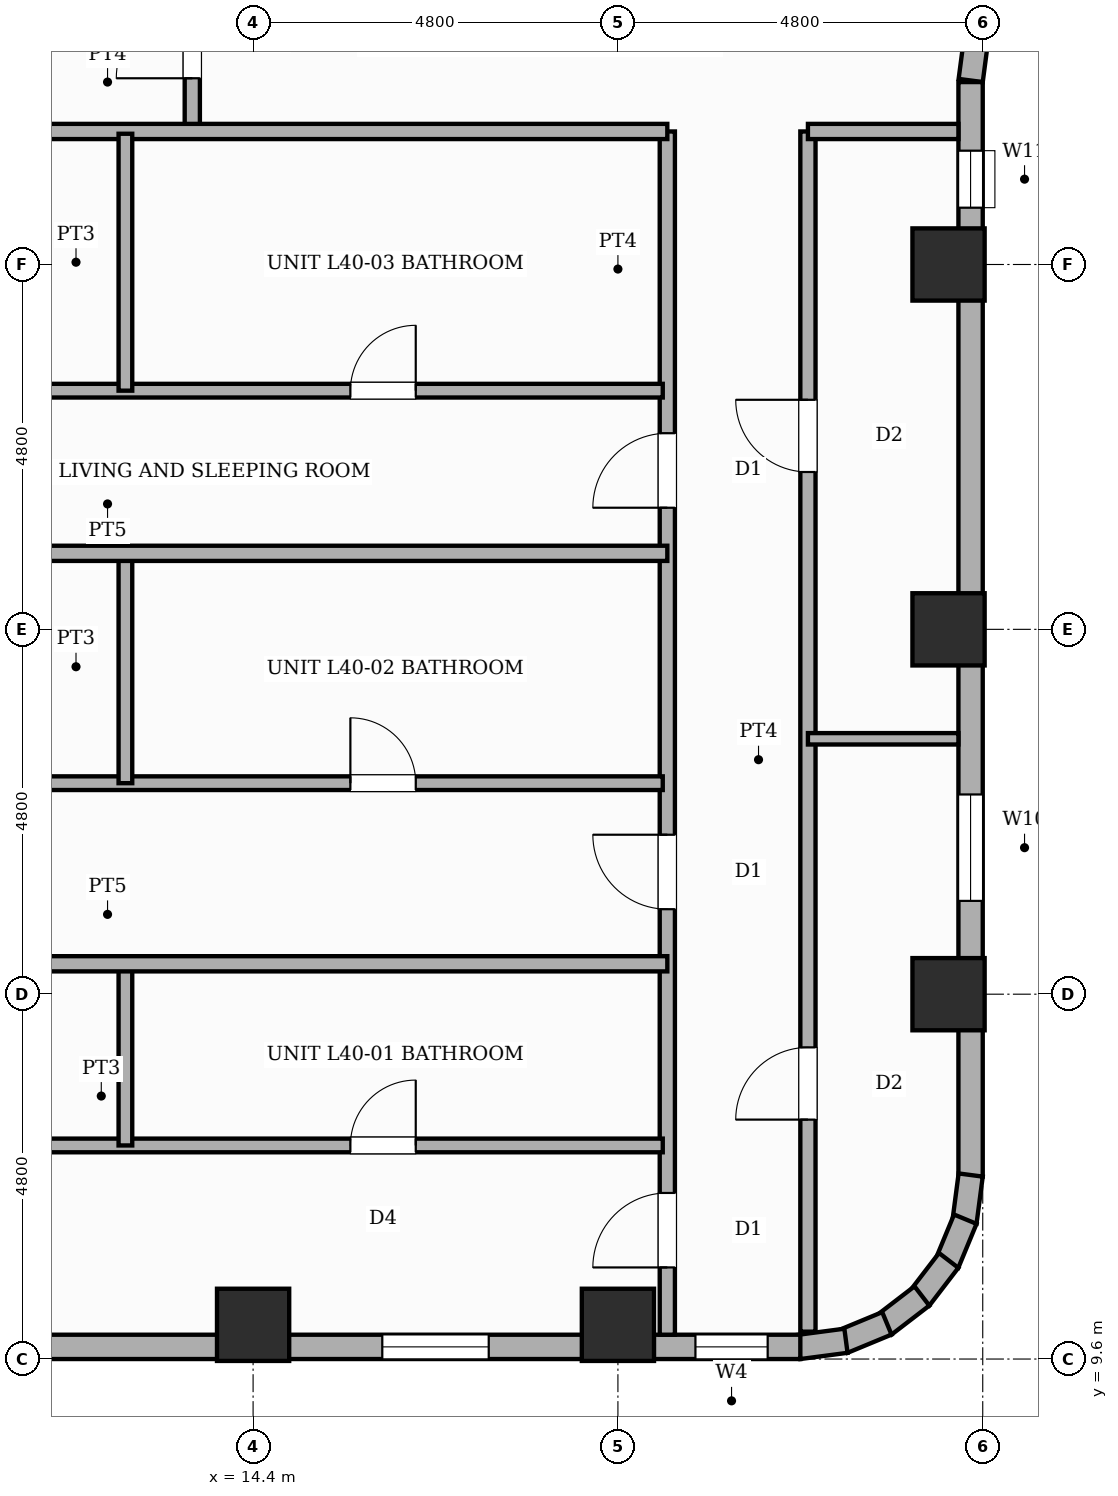
"""IFC4 building model, lengths in metres.
Left out: names, types, materials, properties, quantities, classifications, styles, units other than length and angle.
Written with IfcOpenShell. Run it as: python <this file> out.ifc"""

import sys

from ifc_helpers import new_model, si_unit, direction, frame, frame_2d, origin, origin_2d, place, context, subcontext, project, spatial, rectangle, extrude, element, fill, save


model = new_model("IFC4")
c1 = context("Model", 3, precision=1e-05, world=origin(), true_north=direction((0.0, 1.0)))
c2 = subcontext(c1, "Body", "Model", "MODEL_VIEW")
j1 = project(units=[si_unit("LENGTHUNIT", "METRE"), si_unit("PLANEANGLEUNIT", "RADIAN")], contexts=[c1])
p1 = place(None, origin())
s1 = spatial("IfcSite", under=j1, at=p1, CompositionType="ELEMENT")
p2 = place(p1, origin())
s2 = spatial("IfcBuilding", under=s1, at=p2, CompositionType="ELEMENT")
p3 = place(p2, frame((0.0, 0.0, 154.0)))
s3 = spatial("IfcBuildingStorey", under=s2, at=p3, CompositionType="ELEMENT", Elevation=154.0)
for number, where, z_axis, x_axis in (
    (1, (14.4, 10.05, 0.0), (0.0, 0.0, 1.0), (1.0, 0.0, 0.0)),
    (2, (19.2, 10.05, 0.0), (0.0, 0.0, 1.0), (1.0, 0.0, 0.0)),
    (3, (23.55, 14.4, 0.0), (0.0, 0.0, 1.0), (1.0, 0.0, 0.0)),
    (4, (23.55, 19.2, 0.0), (0.0, 0.0, 1.0), (1.0, 0.0, 0.0)),
    (5, (23.55, 24.0, 0.0), (0.0, 0.0, 1.0), (1.0, 0.0, 0.0)),
):
    element("IfcColumn", number, at=place(p3, frame(where, z_axis=z_axis, x_axis=x_axis)), inside=s3, PredefinedType="COLUMN", context=c2, shape_type="SweptSolid", body=[
        extrude(rectangle(XDim=0.95, YDim=0.95, at=origin_2d()), origin(), (0.0, 0.0, 1.0), 3.6),
    ])
p4 = place(p3, frame((23.923, 27.042, 0.0), z_axis=(0.0, 0.0, 1.0), x_axis=(-0.130555323746, -0.9914410257, 0.0)))
e6 = element("IfcWall", 6, at=p4, inside=s3, PredefinedType="STANDARD", context=c2, shape_type="SweptSolid", body=[
    extrude(rectangle(XDim=0.626, YDim=0.32, at=frame_2d((0.313, 0.0))), origin(), (0.0, 0.0, 1.0), 2.54),
])
p5 = place(p3, frame((23.84, 26.4, 0.0), z_axis=(0.0, 0.0, 1.0), x_axis=(0.0, -1.0, 0.0)))
e7 = element("IfcWall", 7, at=p5, inside=s3, PredefinedType="STANDARD", context=c2, shape_type="SweptSolid", body=[
    extrude(rectangle(XDim=14.4, YDim=0.32, at=frame_2d((7.2, 0.0))), origin(), (0.0, 0.0, 1.0), 2.54),
])
p6 = place(p5, frame((9.373, 0.0, 0.65)))
e8 = element("IfcOpeningElement", 8, at=p6, cuts=e7, PredefinedType="OPENING", context=c2, shape_type="SweptSolid", body=[
    extrude(rectangle(XDim=1.4, YDim=1.1, at=frame_2d((0.7, 0.55))), frame((0.0, 0.17, 0.0), z_axis=(0.0, -1.0, 0.0), x_axis=(1.0, 0.0, 0.0)), (0.0, 0.0, 1.0), 0.34),
])
p7 = place(p5, frame((0.903, 0.0, 0.45)))
e9 = element("IfcOpeningElement", 9, at=p7, cuts=e7, PredefinedType="OPENING", context=c2, shape_type="SweptSolid", body=[
    extrude(rectangle(XDim=0.75, YDim=1.8, at=frame_2d((0.375, 0.9))), frame((0.0, 0.17, 0.0), z_axis=(0.0, -1.0, 0.0), x_axis=(1.0, 0.0, 0.0)), (0.0, 0.0, 1.0), 0.34),
])
p8 = place(p3, frame((23.841, 12.021, 0.0), z_axis=(0.0, 0.0, 1.0), x_axis=(-0.130504898859, -0.991447664465, 0.0)))
e10 = element("IfcWall", 10, at=p8, inside=s3, PredefinedType="STANDARD", context=c2, shape_type="SweptSolid", body=[
    extrude(rectangle(XDim=0.627, YDim=0.32, at=frame_2d((0.313, 0.0))), origin(), (0.0, 0.0, 1.0), 3.36),
])
for number, where, z_axis, x_axis in (
    (11, (23.771, 11.44, 0.0), (0.0, 0.0, 1.0), (-0.383, -0.924, 0.0)),
    (12, (23.552, 10.897, 0.0), (0.0, 0.0, 1.0), (-0.609, -0.793, 0.0)),
    (13, (23.2, 10.43, 0.0), (0.0, 0.0, 1.0), (-0.793, -0.609, 0.0)),
    (14, (22.739, 10.069, 0.0), (0.0, 0.0, 1.0), (-0.924, -0.383, 0.0)),
    (15, (22.2, 9.84, 0.0), (0.0, 0.0, 1.0), (-0.991, -0.131, 0.0)),
):
    element("IfcWall", number, at=place(p3, frame(where, z_axis=z_axis, x_axis=x_axis)), inside=s3, PredefinedType="STANDARD", context=c2, shape_type="SweptSolid", body=[
        extrude(rectangle(XDim=0.626, YDim=0.32, at=frame_2d((0.313, 0.0))), origin(), (0.0, 0.0, 1.0), 3.36),
    ])
p9 = place(p3, frame((21.6, 9.76, 0.0), z_axis=(0.0, 0.0, 1.0), x_axis=(-1.0, 0.0, 0.0)))
e16 = element("IfcWall", 16, at=p9, inside=s3, PredefinedType="STANDARD", context=c2, shape_type="SweptSolid", body=[
    extrude(rectangle(XDim=14.4, YDim=0.32, at=frame_2d((7.2, 0.0))), origin(), (0.0, 0.0, 1.0), 2.54),
])
p10 = place(p9, frame((4.1, 0.0, 0.65)))
e17 = element("IfcOpeningElement", 17, at=p10, cuts=e16, PredefinedType="OPENING", context=c2, shape_type="SweptSolid", body=[
    extrude(rectangle(XDim=1.4, YDim=1.1, at=frame_2d((0.7, 0.55))), frame((0.0, 0.17, 0.0), z_axis=(0.0, -1.0, 0.0), x_axis=(1.0, 0.0, 0.0)), (0.0, 0.0, 1.0), 0.34),
])
p11 = place(p9, frame((0.43, 0.0, 0.45)))
e18 = element("IfcOpeningElement", 18, at=p11, cuts=e16, PredefinedType="OPENING", context=c2, shape_type="SweptSolid", body=[
    extrude(rectangle(XDim=0.95, YDim=1.8, at=frame_2d((0.475, 0.9))), frame((0.0, 0.17, 0.0), z_axis=(0.0, -1.0, 0.0), x_axis=(1.0, 0.0, 0.0)), (0.0, 0.0, 1.0), 0.34),
])
p12 = place(p3, frame((13.6, 25.75, 0.0), z_axis=(0.0, 0.0, 1.0), x_axis=(0.0, 1.0, 0.0)))
e19 = element("IfcWall", 19, at=p12, inside=s3, PredefinedType="POLYGONAL", context=c2, shape_type="SweptSolid", body=[
    extrude(rectangle(XDim=5.15, YDim=0.2, at=frame_2d((2.575, 0.0))), origin(), (0.0, 0.0, 1.0), 3.36),
])
p13 = place(p12, frame((0.7, 0.0, 0.0)))
e20 = element("IfcOpeningElement", 20, at=p13, cuts=e19, PredefinedType="OPENING", context=c2, shape_type="SweptSolid", body=[
    extrude(rectangle(XDim=1.0, YDim=2.15, at=frame_2d((0.5, 1.075))), frame((0.0, 0.11, 0.0), z_axis=(0.0, -1.0, 0.0), x_axis=(1.0, 0.0, 0.0)), (0.0, 0.0, 1.0), 0.22),
])
p14 = place(p3, frame((19.85, 9.92, 0.0), z_axis=(0.0, 0.0, 1.0), x_axis=(0.0, 1.0, 0.0)))
e21 = element("IfcWall", 21, at=p14, inside=s3, PredefinedType="PARTITIONING", context=c2, shape_type="SweptSolid", body=[
    extrude(rectangle(XDim=15.83, YDim=0.2, at=frame_2d((7.915, 0.0))), origin(), (0.0, 0.0, 1.0), 3.36),
])
p15 = place(p14, frame((0.885, 0.0, 0.0)))
e22 = element("IfcOpeningElement", 22, at=p15, cuts=e21, PredefinedType="OPENING", context=c2, shape_type="SweptSolid", body=[
    extrude(rectangle(XDim=0.98, YDim=2.18, at=frame_2d((0.49, 1.09))), frame((0.0, 0.11, 0.0), z_axis=(0.0, -1.0, 0.0), x_axis=(1.0, 0.0, 0.0)), (0.0, 0.0, 1.0), 0.22),
])
p16 = place(p14, frame((5.598, 0.0, 0.0)))
e23 = element("IfcOpeningElement", 23, at=p16, cuts=e21, PredefinedType="OPENING", context=c2, shape_type="SweptSolid", body=[
    extrude(rectangle(XDim=0.98, YDim=2.18, at=frame_2d((0.49, 1.09))), frame((0.0, 0.11, 0.0), z_axis=(0.0, -1.0, 0.0), x_axis=(1.0, 0.0, 0.0)), (0.0, 0.0, 1.0), 0.22),
])
p17 = place(p14, frame((10.88, 0.0, 0.0)))
e24 = element("IfcOpeningElement", 24, at=p17, cuts=e21, PredefinedType="OPENING", context=c2, shape_type="SweptSolid", body=[
    extrude(rectangle(XDim=0.98, YDim=2.18, at=frame_2d((0.49, 1.09))), frame((0.0, 0.11, 0.0), z_axis=(0.0, -1.0, 0.0), x_axis=(1.0, 0.0, 0.0)), (0.0, 0.0, 1.0), 0.22),
])
p18 = place(p3, frame((21.7, 9.96, 0.0), z_axis=(0.0, 0.0, 1.0), x_axis=(0.0, 1.0, 0.0)))
e25 = element("IfcWall", 25, at=p18, inside=s3, PredefinedType="PARTITIONING", context=c2, shape_type="SweptSolid", body=[
    extrude(rectangle(XDim=15.79, YDim=0.2, at=frame_2d((7.895, 0.0))), origin(), (0.0, 0.0, 1.0), 3.36),
])
p19 = place(p18, frame((2.79, 0.0, 0.0)))
e26 = element("IfcOpeningElement", 26, at=p19, cuts=e25, PredefinedType="OPENING", context=c2, shape_type="SweptSolid", body=[
    extrude(rectangle(XDim=0.95, YDim=2.15, at=frame_2d((0.475, 1.075))), frame((0.0, 0.11, 0.0), z_axis=(0.0, -1.0, 0.0), x_axis=(1.0, 0.0, 0.0)), (0.0, 0.0, 1.0), 0.22),
])
p20 = place(p18, frame((11.31, 0.0, 0.0)))
e27 = element("IfcOpeningElement", 27, at=p20, cuts=e25, PredefinedType="OPENING", context=c2, shape_type="SweptSolid", body=[
    extrude(rectangle(XDim=0.95, YDim=2.15, at=frame_2d((0.475, 1.075))), frame((0.0, 0.11, 0.0), z_axis=(0.0, -1.0, 0.0), x_axis=(1.0, 0.0, 0.0)), (0.0, 0.0, 1.0), 0.22),
])
p21 = place(p3, frame((5.12, 25.75, 0.0), z_axis=(0.0, 0.0, 1.0), x_axis=(1.0, 0.0, 0.0)))
e28 = element("IfcWall", 28, at=p21, inside=s3, PredefinedType="PARTITIONING", context=c2, shape_type="SweptSolid", body=[
    extrude(rectangle(XDim=14.73, YDim=0.2, at=frame_2d((7.365, 0.0))), origin(), (0.0, 0.0, 1.0), 3.36),
])
p22 = place(p3, frame((21.7, 25.75, 0.0), z_axis=(0.0, 0.0, 1.0), x_axis=(1.0, 0.0, 0.0)))
e29 = element("IfcWall", 29, at=p22, inside=s3, PredefinedType="PARTITIONING", context=c2, shape_type="SweptSolid", body=[
    extrude(rectangle(XDim=1.98, YDim=0.2, at=frame_2d((0.99, 0.0))), origin(), (0.0, 0.0, 1.0), 3.36),
])
p23 = place(p3, frame((5.12, 12.41, 0.0), z_axis=(0.0, 0.0, 1.0), x_axis=(1.0, 0.0, 0.0)))
e30 = element("IfcWall", 30, at=p23, inside=s3, PredefinedType="PLUMBINGWALL", context=c2, shape_type="SweptSolid", body=[
    extrude(rectangle(XDim=14.67, YDim=0.18, at=frame_2d((7.335, 0.0))), origin(), (0.0, 0.0, 1.0), 3.36),
])
p24 = place(p23, frame((3.145, 0.0, 0.0)))
e31 = element("IfcOpeningElement", 31, at=p24, cuts=e30, PredefinedType="OPENING", context=c2, shape_type="SweptSolid", body=[
    extrude(rectangle(XDim=0.86, YDim=2.1, at=frame_2d((0.43, 1.05))), frame((0.0, 0.1, 0.0), z_axis=(0.0, -1.0, 0.0), x_axis=(1.0, 0.0, 0.0)), (0.0, 0.0, 1.0), 0.2),
])
p25 = place(p23, frame((10.56, 0.0, 0.0)))
e32 = element("IfcOpeningElement", 32, at=p25, cuts=e30, PredefinedType="OPENING", context=c2, shape_type="SweptSolid", body=[
    extrude(rectangle(XDim=0.86, YDim=2.1, at=frame_2d((0.43, 1.05))), frame((0.0, 0.1, 0.0), z_axis=(0.0, -1.0, 0.0), x_axis=(1.0, 0.0, 0.0)), (0.0, 0.0, 1.0), 0.2),
])
p26 = place(p3, frame((12.72, 12.41, 0.0), z_axis=(0.0, 0.0, 1.0), x_axis=(0.0, 1.0, 0.0)))
e33 = element("IfcWall", 33, at=p26, inside=s3, PredefinedType="PLUMBINGWALL", context=c2, shape_type="SweptSolid", body=[
    extrude(rectangle(XDim=2.43, YDim=0.18, at=frame_2d((1.215, 0.0))), origin(), (0.0, 0.0, 1.0), 3.36),
])
p27 = place(p3, frame((5.12, 14.8, 0.0), z_axis=(0.0, 0.0, 1.0), x_axis=(1.0, 0.0, 0.0)))
e34 = element("IfcWall", 34, at=p27, inside=s3, PredefinedType="SOLIDWALL", context=c2, shape_type="SweptSolid", body=[
    extrude(rectangle(XDim=14.73, YDim=0.2, at=frame_2d((7.365, 0.0))), origin(), (0.0, 0.0, 1.0), 3.36),
])
p28 = place(p3, frame((5.12, 17.176, 0.0), z_axis=(0.0, 0.0, 1.0), x_axis=(1.0, 0.0, 0.0)))
e35 = element("IfcWall", 35, at=p28, inside=s3, PredefinedType="PLUMBINGWALL", context=c2, shape_type="SweptSolid", body=[
    extrude(rectangle(XDim=14.67, YDim=0.18, at=frame_2d((7.335, 0.0))), origin(), (0.0, 0.0, 1.0), 3.36),
])
p29 = place(p28, frame((3.145, 0.0, 0.0)))
e36 = element("IfcOpeningElement", 36, at=p29, cuts=e35, PredefinedType="OPENING", context=c2, shape_type="SweptSolid", body=[
    extrude(rectangle(XDim=0.86, YDim=2.1, at=frame_2d((0.43, 1.05))), frame((0.0, 0.1, 0.0), z_axis=(0.0, -1.0, 0.0), x_axis=(1.0, 0.0, 0.0)), (0.0, 0.0, 1.0), 0.2),
])
p30 = place(p28, frame((10.56, 0.0, 0.0)))
e37 = element("IfcOpeningElement", 37, at=p30, cuts=e35, PredefinedType="OPENING", context=c2, shape_type="SweptSolid", body=[
    extrude(rectangle(XDim=0.86, YDim=2.1, at=frame_2d((0.43, 1.05))), frame((0.0, 0.1, 0.0), z_axis=(0.0, -1.0, 0.0), x_axis=(1.0, 0.0, 0.0)), (0.0, 0.0, 1.0), 0.2),
])
p31 = place(p3, frame((12.72, 17.176, 0.0), z_axis=(0.0, 0.0, 1.0), x_axis=(0.0, 1.0, 0.0)))
e38 = element("IfcWall", 38, at=p31, inside=s3, PredefinedType="PLUMBINGWALL", context=c2, shape_type="SweptSolid", body=[
    extrude(rectangle(XDim=3.064, YDim=0.18, at=frame_2d((1.532, 0.0))), origin(), (0.0, 0.0, 1.0), 3.36),
])
p32 = place(p3, frame((5.12, 20.2, 0.0), z_axis=(0.0, 0.0, 1.0), x_axis=(1.0, 0.0, 0.0)))
e39 = element("IfcWall", 39, at=p32, inside=s3, PredefinedType="SOLIDWALL", context=c2, shape_type="SweptSolid", body=[
    extrude(rectangle(XDim=14.73, YDim=0.2, at=frame_2d((7.365, 0.0))), origin(), (0.0, 0.0, 1.0), 3.36),
])
p33 = place(p3, frame((5.12, 22.34, 0.0), z_axis=(0.0, 0.0, 1.0), x_axis=(1.0, 0.0, 0.0)))
e40 = element("IfcWall", 40, at=p33, inside=s3, PredefinedType="PLUMBINGWALL", context=c2, shape_type="SweptSolid", body=[
    extrude(rectangle(XDim=14.67, YDim=0.18, at=frame_2d((7.335, 0.0))), origin(), (0.0, 0.0, 1.0), 3.36),
])
p34 = place(p33, frame((3.145, 0.0, 0.0)))
e41 = element("IfcOpeningElement", 41, at=p34, cuts=e40, PredefinedType="OPENING", context=c2, shape_type="SweptSolid", body=[
    extrude(rectangle(XDim=0.86, YDim=2.1, at=frame_2d((0.43, 1.05))), frame((0.0, 0.1, 0.0), z_axis=(0.0, -1.0, 0.0), x_axis=(1.0, 0.0, 0.0)), (0.0, 0.0, 1.0), 0.2),
])
p35 = place(p33, frame((10.56, 0.0, 0.0)))
e42 = element("IfcOpeningElement", 42, at=p35, cuts=e40, PredefinedType="OPENING", context=c2, shape_type="SweptSolid", body=[
    extrude(rectangle(XDim=0.86, YDim=2.1, at=frame_2d((0.43, 1.05))), frame((0.0, 0.1, 0.0), z_axis=(0.0, -1.0, 0.0), x_axis=(1.0, 0.0, 0.0)), (0.0, 0.0, 1.0), 0.2),
])
p36 = place(p3, frame((12.72, 22.34, 0.0), z_axis=(0.0, 0.0, 1.0), x_axis=(0.0, 1.0, 0.0)))
e43 = element("IfcWall", 43, at=p36, inside=s3, PredefinedType="PLUMBINGWALL", context=c2, shape_type="SweptSolid", body=[
    extrude(rectangle(XDim=3.38, YDim=0.18, at=frame_2d((1.69, 0.0))), origin(), (0.0, 0.0, 1.0), 3.36),
])
p37 = place(p3, frame((21.7, 17.76, 0.0), z_axis=(0.0, 0.0, 1.0), x_axis=(1.0, 0.0, 0.0)))
e44 = element("IfcWall", 44, at=p37, inside=s3, PredefinedType="PARTITIONING", context=c2, shape_type="SweptSolid", body=[
    extrude(rectangle(XDim=1.98, YDim=0.15, at=frame_2d((0.99, 0.0))), origin(), (0.0, 0.0, 1.0), 3.36),
])
p38 = place(p6, origin())
e45 = element("IfcWindow", 45, at=p38, inside=s3, PartitioningType="SINGLE_PANEL", PredefinedType="WINDOW", context=c2, shape_type="SweptSolid", body=[
    extrude(rectangle(XDim=1.4, YDim=1.1, at=frame_2d((0.7, 0.55))), frame((0.0, 0.03, 0.0), z_axis=(0.0, -1.0, 0.0), x_axis=(1.0, 0.0, 0.0)), (0.0, 0.0, 1.0), 0.06),
])
fill(e8, e45)
p39 = place(p7, origin())
e46 = element("IfcWindow", 46, at=p39, inside=s3, PartitioningType="SINGLE_PANEL", PredefinedType="WINDOW", context=c2, shape_type="SweptSolid", body=[
    extrude(rectangle(XDim=0.75, YDim=1.8, at=frame_2d((0.375, 0.9))), frame((0.0, 0.03, 0.0), z_axis=(0.0, -1.0, 0.0), x_axis=(1.0, 0.0, 0.0)), (0.0, 0.0, 1.0), 0.06),
])
fill(e9, e46)
p40 = place(p10, origin())
e47 = element("IfcWindow", 47, at=p40, inside=s3, PartitioningType="SINGLE_PANEL", PredefinedType="WINDOW", context=c2, shape_type="SweptSolid", body=[
    extrude(rectangle(XDim=1.4, YDim=1.1, at=frame_2d((0.7, 0.55))), frame((0.0, 0.03, 0.0), z_axis=(0.0, -1.0, 0.0), x_axis=(1.0, 0.0, 0.0)), (0.0, 0.0, 1.0), 0.06),
])
fill(e17, e47)
p41 = place(p11, origin())
e48 = element("IfcWindow", 48, at=p41, inside=s3, PartitioningType="SINGLE_PANEL", PredefinedType="WINDOW", context=c2, shape_type="SweptSolid", body=[
    extrude(rectangle(XDim=0.95, YDim=1.8, at=frame_2d((0.475, 0.9))), frame((0.0, 0.03, 0.0), z_axis=(0.0, -1.0, 0.0), x_axis=(1.0, 0.0, 0.0)), (0.0, 0.0, 1.0), 0.06),
])
fill(e18, e48)
p42 = place(p13, origin())
e49 = element("IfcDoor", 49, at=p42, inside=s3, OperationType="SINGLE_SWING_LEFT", PredefinedType="DOOR", context=c2, shape_type="SweptSolid", body=[
    extrude(rectangle(XDim=1.0, YDim=2.15, at=frame_2d((0.5, 1.075))), frame((0.0, 0.025, 0.0), z_axis=(0.0, -1.0, 0.0), x_axis=(1.0, 0.0, 0.0)), (0.0, 0.0, 1.0), 0.05),
])
fill(e20, e49)
p43 = place(p15, origin())
e50 = element("IfcDoor", 50, at=p43, inside=s3, OperationType="SINGLE_SWING_LEFT", PredefinedType="DOOR", context=c2, shape_type="SweptSolid", body=[
    extrude(rectangle(XDim=0.98, YDim=2.18, at=frame_2d((0.49, 1.09))), frame((0.0, 0.025, 0.0), z_axis=(0.0, -1.0, 0.0), x_axis=(1.0, 0.0, 0.0)), (0.0, 0.0, 1.0), 0.05),
])
fill(e22, e50)
p44 = place(p25, origin())
e51 = element("IfcDoor", 51, at=p44, inside=s3, OperationType="SINGLE_SWING_RIGHT", PredefinedType="DOOR", context=c2, shape_type="SweptSolid", body=[
    extrude(rectangle(XDim=0.86, YDim=2.1, at=frame_2d((0.43, 1.05))), frame((0.0, 0.025, 0.0), z_axis=(0.0, -1.0, 0.0), x_axis=(1.0, 0.0, 0.0)), (0.0, 0.0, 1.0), 0.05),
])
fill(e32, e51)
p45 = place(p16, origin())
e52 = element("IfcDoor", 52, at=p45, inside=s3, OperationType="SINGLE_SWING_RIGHT", PredefinedType="DOOR", context=c2, shape_type="SweptSolid", body=[
    extrude(rectangle(XDim=0.98, YDim=2.18, at=frame_2d((0.49, 1.09))), frame((0.0, 0.025, 0.0), z_axis=(0.0, -1.0, 0.0), x_axis=(1.0, 0.0, 0.0)), (0.0, 0.0, 1.0), 0.05),
])
fill(e23, e52)
p46 = place(p30, origin())
e53 = element("IfcDoor", 53, at=p46, inside=s3, OperationType="SINGLE_SWING_LEFT", PredefinedType="DOOR", context=c2, shape_type="SweptSolid", body=[
    extrude(rectangle(XDim=0.86, YDim=2.1, at=frame_2d((0.43, 1.05))), frame((0.0, 0.025, 0.0), z_axis=(0.0, -1.0, 0.0), x_axis=(1.0, 0.0, 0.0)), (0.0, 0.0, 1.0), 0.05),
])
fill(e37, e53)
p47 = place(p17, origin())
e54 = element("IfcDoor", 54, at=p47, inside=s3, OperationType="SINGLE_SWING_LEFT", PredefinedType="DOOR", context=c2, shape_type="SweptSolid", body=[
    extrude(rectangle(XDim=0.98, YDim=2.18, at=frame_2d((0.49, 1.09))), frame((0.0, 0.025, 0.0), z_axis=(0.0, -1.0, 0.0), x_axis=(1.0, 0.0, 0.0)), (0.0, 0.0, 1.0), 0.05),
])
fill(e24, e54)
p48 = place(p35, origin())
e55 = element("IfcDoor", 55, at=p48, inside=s3, OperationType="SINGLE_SWING_RIGHT", PredefinedType="DOOR", context=c2, shape_type="SweptSolid", body=[
    extrude(rectangle(XDim=0.86, YDim=2.1, at=frame_2d((0.43, 1.05))), frame((0.0, 0.025, 0.0), z_axis=(0.0, -1.0, 0.0), x_axis=(1.0, 0.0, 0.0)), (0.0, 0.0, 1.0), 0.05),
])
fill(e42, e55)
p49 = place(p19, origin())
e56 = element("IfcDoor", 56, at=p49, inside=s3, OperationType="SINGLE_SWING_LEFT", PredefinedType="DOOR", context=c2, shape_type="SweptSolid", body=[
    extrude(rectangle(XDim=0.95, YDim=2.15, at=frame_2d((0.475, 1.075))), frame((0.0, 0.025, 0.0), z_axis=(0.0, -1.0, 0.0), x_axis=(1.0, 0.0, 0.0)), (0.0, 0.0, 1.0), 0.05),
])
fill(e26, e56)
p50 = place(p20, origin())
e57 = element("IfcDoor", 57, at=p50, inside=s3, OperationType="SINGLE_SWING_RIGHT", PredefinedType="DOOR", context=c2, shape_type="SweptSolid", body=[
    extrude(rectangle(XDim=0.95, YDim=2.15, at=frame_2d((0.475, 1.075))), frame((0.0, 0.025, 0.0), z_axis=(0.0, -1.0, 0.0), x_axis=(1.0, 0.0, 0.0)), (0.0, 0.0, 1.0), 0.05),
])
fill(e27, e57)
save(model, sys.argv[1])
